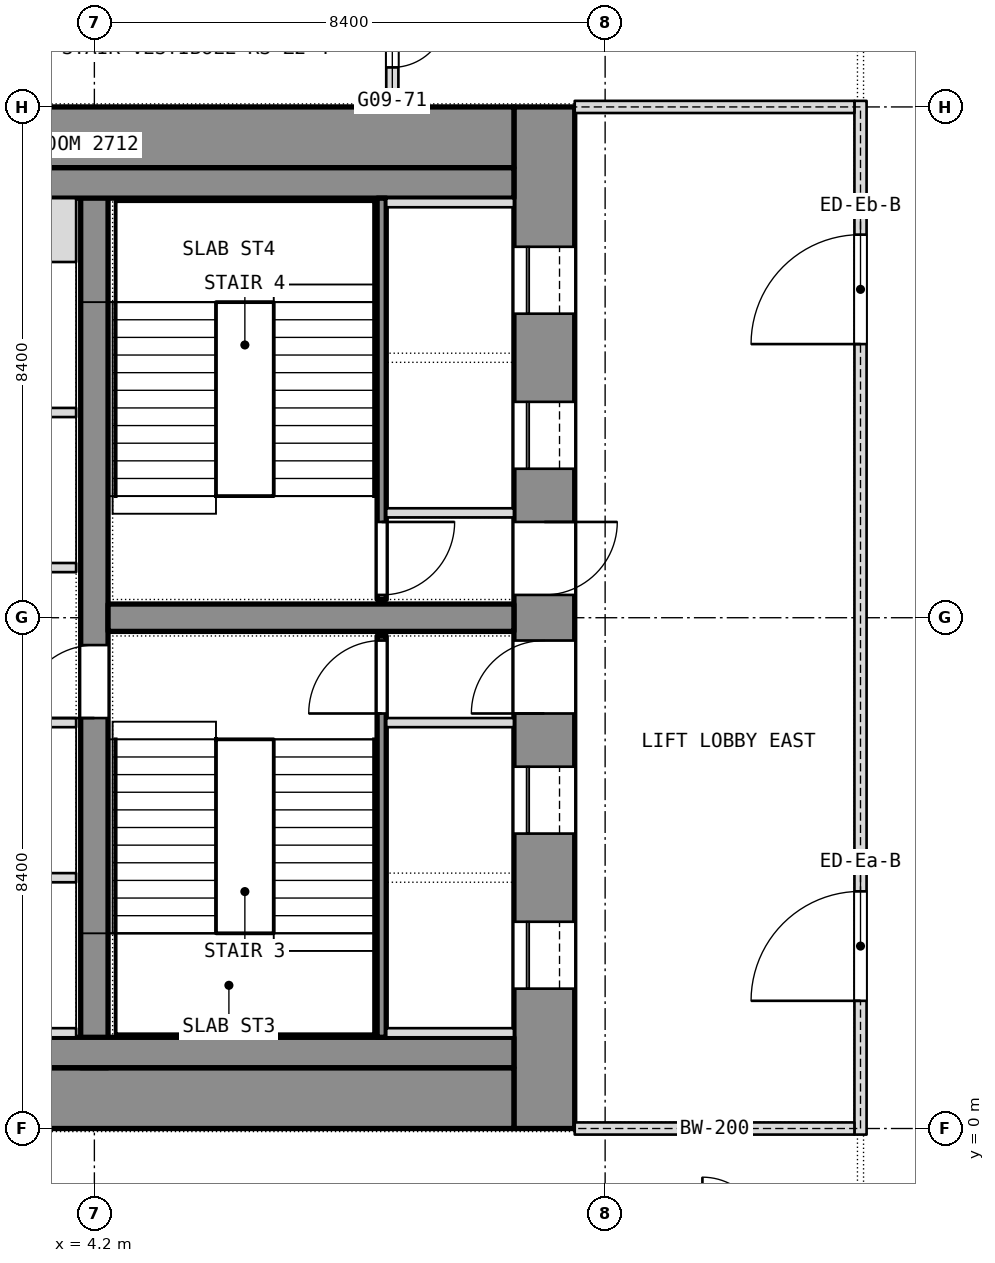
"""IFC4 building model, lengths in metres.
Left out: names, types, materials, properties, quantities, classifications, styles, units other than length and angle.
Written with IfcOpenShell. Run it as: python <this file> out.ifc"""

import sys

from ifc_helpers import new_model, si_unit, direction, frame, frame_2d, origin, place, context, subcontext, project, spatial, rectangle, extrude, element, fill, save


model = new_model("IFC4")
c1 = context("Model", 3, precision=1e-05, world=origin(), true_north=direction((0.0, 1.0)))
c2 = subcontext(c1, "Body", "Model", "MODEL_VIEW")
j1 = project(units=[si_unit("LENGTHUNIT", "METRE"), si_unit("PLANEANGLEUNIT", "RADIAN")], contexts=[c1])
p1 = place(None, origin())
s1 = spatial("IfcSite", under=j1, at=p1, CompositionType="ELEMENT")
p2 = place(p1, origin())
s2 = spatial("IfcBuilding", under=s1, at=p2, CompositionType="ELEMENT")
p3 = place(p2, frame((0.0, 0.0, 122.9)))
s3 = spatial("IfcBuildingStorey", under=s2, at=p3, CompositionType="ELEMENT", Elevation=122.9)
p4 = place(p3, frame((11.6, 0.0, 0.0), z_axis=(0.0, 0.0, 1.0), x_axis=(0.0, 1.0, 0.0)))
e1 = element("IfcWall", 1, at=p4, inside=s3, PredefinedType="SHEAR", context=c2, shape_type="SweptSolid", body=[
    extrude(rectangle(XDim=16.8, YDim=1.0, at=frame_2d((8.4, 0.0))), origin(), (0.0, 0.0, 1.0), 3.6),
])
p5 = place(p4, frame((2.3, 0.0, 0.0)))
e2 = element("IfcOpeningElement", 2, at=p5, cuts=e1, PredefinedType="OPENING", context=c2, shape_type="SweptSolid", body=[
    extrude(rectangle(XDim=1.1, YDim=2.1, at=frame_2d((0.55, 1.05))), frame((0.0, 0.5, 0.0), z_axis=(0.0, -1.0, 0.0), x_axis=(1.0, 0.0, 0.0)), (0.0, 0.0, 1.0), 1.0),
])
p6 = place(p4, frame((4.85, 0.0, 0.0)))
e3 = element("IfcOpeningElement", 3, at=p6, cuts=e1, PredefinedType="OPENING", context=c2, shape_type="SweptSolid", body=[
    extrude(rectangle(XDim=1.1, YDim=2.1, at=frame_2d((0.55, 1.05))), frame((0.0, 0.5, 0.0), z_axis=(0.0, -1.0, 0.0), x_axis=(1.0, 0.0, 0.0)), (0.0, 0.0, 1.0), 1.0),
])
p7 = place(p4, frame((6.825, 0.0, 0.0)))
e4 = element("IfcOpeningElement", 4, at=p7, cuts=e1, PredefinedType="OPENING", context=c2, shape_type="SweptSolid", body=[
    extrude(rectangle(XDim=1.2, YDim=2.1, at=frame_2d((0.6, 1.05))), frame((0.0, 0.5, 0.0), z_axis=(0.0, -1.0, 0.0), x_axis=(1.0, 0.0, 0.0)), (0.0, 0.0, 1.0), 1.0),
])
p8 = place(p4, frame((13.4, 0.0, 0.0)))
e5 = element("IfcOpeningElement", 5, at=p8, cuts=e1, PredefinedType="OPENING", context=c2, shape_type="SweptSolid", body=[
    extrude(rectangle(XDim=1.1, YDim=2.1, at=frame_2d((0.55, 1.05))), frame((0.0, 0.5, 0.0), z_axis=(0.0, -1.0, 0.0), x_axis=(1.0, 0.0, 0.0)), (0.0, 0.0, 1.0), 1.0),
])
p9 = place(p4, frame((10.85, 0.0, 0.0)))
e6 = element("IfcOpeningElement", 6, at=p9, cuts=e1, PredefinedType="OPENING", context=c2, shape_type="SweptSolid", body=[
    extrude(rectangle(XDim=1.1, YDim=2.1, at=frame_2d((0.55, 1.05))), frame((0.0, 0.5, 0.0), z_axis=(0.0, -1.0, 0.0), x_axis=(1.0, 0.0, 0.0)), (0.0, 0.0, 1.0), 1.0),
])
p10 = place(p4, frame((8.775, 0.0, 0.0)))
e7 = element("IfcOpeningElement", 7, at=p10, cuts=e1, PredefinedType="OPENING", context=c2, shape_type="SweptSolid", body=[
    extrude(rectangle(XDim=1.2, YDim=2.1, at=frame_2d((0.6, 1.05))), frame((0.0, 0.5, 0.0), z_axis=(0.0, -1.0, 0.0), x_axis=(1.0, 0.0, 0.0)), (0.0, 0.0, 1.0), 1.0),
])
for number, where, z_axis, x_axis in (
    (8, (-11.1, 0.5, 0.0), (0.0, 0.0, 1.0), (1.0, 0.0, 0.0)),
    (9, (-11.1, 16.3, 0.0), (0.0, 0.0, 1.0), (1.0, 0.0, 0.0)),
):
    element("IfcWall", number, at=place(p3, frame(where, z_axis=z_axis, x_axis=x_axis)), inside=s3, PredefinedType="SHEAR", context=c2, shape_type="SweptSolid", body=[
        extrude(rectangle(XDim=22.2, YDim=1.0, at=frame_2d((11.1, 0.0))), origin(), (0.0, 0.0, 1.0), 3.6),
    ])
p11 = place(p3, frame((4.2, 1.0, 0.0), z_axis=(0.0, 0.0, 1.0), x_axis=(0.0, 1.0, 0.0)))
e10 = element("IfcWall", 10, at=p11, inside=s3, PredefinedType="SHEAR", context=c2, shape_type="SweptSolid", body=[
    extrude(rectangle(XDim=14.8, YDim=0.45, at=frame_2d((7.4, 0.0))), origin(), (0.0, 0.0, 1.0), 3.6),
])
p12 = place(p11, frame((5.75, 0.0, 0.0)))
e11 = element("IfcOpeningElement", 11, at=p12, cuts=e10, PredefinedType="OPENING", context=c2, shape_type="SweptSolid", body=[
    extrude(rectangle(XDim=1.2, YDim=2.1, at=frame_2d((0.6, 1.05))), frame((0.0, 0.225, 0.0), z_axis=(0.0, -1.0, 0.0), x_axis=(1.0, 0.0, 0.0)), (0.0, 0.0, 1.0), 0.45),
])
p13 = place(p3, frame((4.425, 8.4, 0.0), z_axis=(0.0, 0.0, 1.0), x_axis=(1.0, 0.0, 0.0)))
e12 = element("IfcWall", 12, at=p13, inside=s3, PredefinedType="SHEAR", context=c2, shape_type="SweptSolid", body=[
    extrude(rectangle(XDim=6.675, YDim=0.45, at=frame_2d((3.337, 0.0))), origin(), (0.0, 0.0, 1.0), 3.6),
])
p14 = place(p3, frame((9.1, 16.9, 0.0), z_axis=(0.0, 0.0, 1.0), x_axis=(0.0, 1.0, 0.0)))
e13 = element("IfcWall", 13, at=p14, inside=s3, PredefinedType="PARTITIONING", context=c2, shape_type="SweptSolid", body=[
    extrude(rectangle(XDim=1.8, YDim=0.2, at=frame_2d((0.9, 0.0))), origin(), (0.0, 0.0, 1.0), 3.34),
])
p15 = place(p14, frame((0.55, 0.0, 0.0)))
e14 = element("IfcOpeningElement", 14, at=p15, cuts=e13, PredefinedType="OPENING", context=c2, shape_type="SweptSolid", body=[
    extrude(rectangle(XDim=0.9, YDim=2.1, at=frame_2d((0.45, 1.05))), frame((0.0, 0.1, 0.0), z_axis=(0.0, -1.0, 0.0), x_axis=(1.0, 0.0, 0.0)), (0.0, 0.0, 1.0), 0.2),
])
for number, where, z_axis, x_axis in (
    (15, (-11.1, 1.25, 0.0), (0.0, 0.0, 1.0), (1.0, 0.0, 0.0)),
    (16, (-11.1, 15.55, 0.0), (0.0, 0.0, 1.0), (1.0, 0.0, 0.0)),
):
    element("IfcWall", number, at=place(p3, frame(where, z_axis=z_axis, x_axis=x_axis)), inside=s3, PredefinedType="PARTITIONING", context=c2, shape_type="SweptSolid", body=[
        extrude(rectangle(XDim=22.2, YDim=0.5, at=frame_2d((11.1, 0.0))), origin(), (0.0, 0.0, 1.0), 3.34),
    ])
p16 = place(p3, frame((8.925, 1.5, 0.0), z_axis=(0.0, 0.0, 1.0), x_axis=(0.0, 1.0, 0.0)))
e17 = element("IfcWall", 17, at=p16, inside=s3, PredefinedType="SHEAR", context=c2, shape_type="SweptSolid", body=[
    extrude(rectangle(XDim=6.6, YDim=0.15, at=frame_2d((3.3, 0.0))), origin(), (0.0, 0.0, 1.0), 3.34),
])
p17 = place(p16, frame((5.325, 0.0, 0.0)))
e18 = element("IfcOpeningElement", 18, at=p17, cuts=e17, PredefinedType="OPENING", context=c2, shape_type="SweptSolid", body=[
    extrude(rectangle(XDim=1.2, YDim=2.1, at=frame_2d((0.6, 1.05))), frame((0.0, 0.075, 0.0), z_axis=(0.0, -1.0, 0.0), x_axis=(1.0, 0.0, 0.0)), (0.0, 0.0, 1.0), 0.15),
])
for number, where, z_axis, x_axis in (
    (19, (9.0, 6.675, 0.0), (0.0, 0.0, 1.0), (1.0, 0.0, 0.0)),
    (20, (9.0, 1.575, 0.0), (0.0, 0.0, 1.0), (1.0, 0.0, 0.0)),
):
    element("IfcWall", number, at=place(p3, frame(where, z_axis=z_axis, x_axis=x_axis)), inside=s3, PredefinedType="SHEAR", context=c2, shape_type="SweptSolid", body=[
        extrude(rectangle(XDim=2.1, YDim=0.15, at=frame_2d((1.05, 0.0))), origin(), (0.0, 0.0, 1.0), 3.6),
    ])
p18 = place(p3, frame((8.925, 8.7, 0.0), z_axis=(0.0, 0.0, 1.0), x_axis=(0.0, 1.0, 0.0)))
e21 = element("IfcWall", 21, at=p18, inside=s3, PredefinedType="SHEAR", context=c2, shape_type="SweptSolid", body=[
    extrude(rectangle(XDim=6.6, YDim=0.15, at=frame_2d((3.3, 0.0))), origin(), (0.0, 0.0, 1.0), 3.34),
])
p19 = place(p18, frame((0.075, 0.0, 0.0)))
e22 = element("IfcOpeningElement", 22, at=p19, cuts=e21, PredefinedType="OPENING", context=c2, shape_type="SweptSolid", body=[
    extrude(rectangle(XDim=1.2, YDim=2.1, at=frame_2d((0.6, 1.05))), frame((0.0, 0.075, 0.0), z_axis=(0.0, -1.0, 0.0), x_axis=(1.0, 0.0, 0.0)), (0.0, 0.0, 1.0), 0.15),
])
for number, where, z_axis, x_axis in (
    (23, (9.0, 10.125, 0.0), (0.0, 0.0, 1.0), (1.0, 0.0, 0.0)),
    (24, (9.0, 15.225, 0.0), (0.0, 0.0, 1.0), (1.0, 0.0, 0.0)),
):
    element("IfcWall", number, at=place(p3, frame(where, z_axis=z_axis, x_axis=x_axis)), inside=s3, PredefinedType="SHEAR", context=c2, shape_type="SweptSolid", body=[
        extrude(rectangle(XDim=2.1, YDim=0.15, at=frame_2d((1.05, 0.0))), origin(), (0.0, 0.0, 1.0), 3.6),
    ])
p20 = place(p3, frame((-3.9, 4.125, 0.0), z_axis=(0.0, 0.0, 1.0), x_axis=(1.0, 0.0, 0.0)))
e25 = element("IfcWall", 25, at=p20, inside=s3, PredefinedType="PARTITIONING", context=c2, shape_type="SweptSolid", body=[
    extrude(rectangle(XDim=7.8, YDim=0.15, at=frame_2d((3.9, 0.0))), origin(), (0.0, 0.0, 1.0), 3.34),
])
p21 = place(p20, frame((3.75, 0.0, 0.0)))
e26 = element("IfcOpeningElement", 26, at=p21, cuts=e25, PredefinedType="OPENING", context=c2, shape_type="SweptSolid", body=[
    extrude(rectangle(XDim=1.2, YDim=2.1, at=frame_2d((0.6, 1.05))), frame((0.0, 0.075, 0.0), z_axis=(0.0, -1.0, 0.0), x_axis=(1.0, 0.0, 0.0)), (0.0, 0.0, 1.0), 0.15),
])
p22 = place(p3, frame((-3.9, 11.775, 0.0), z_axis=(0.0, 0.0, 1.0), x_axis=(1.0, 0.0, 0.0)))
e27 = element("IfcWall", 27, at=p22, inside=s3, PredefinedType="PARTITIONING", context=c2, shape_type="SweptSolid", body=[
    extrude(rectangle(XDim=7.8, YDim=0.15, at=frame_2d((3.9, 0.0))), origin(), (0.0, 0.0, 1.0), 3.34),
])
p23 = place(p22, frame((3.3, 0.0, 0.0)))
e28 = element("IfcOpeningElement", 28, at=p23, cuts=e27, PredefinedType="OPENING", context=c2, shape_type="SweptSolid", body=[
    extrude(rectangle(XDim=1.2, YDim=2.1, at=frame_2d((0.6, 1.05))), frame((0.0, 0.075, 0.0), z_axis=(0.0, -1.0, 0.0), x_axis=(1.0, 0.0, 0.0)), (0.0, 0.0, 1.0), 0.15),
])
p24 = place(p3, frame((1.65, 1.575, 0.0), z_axis=(0.0, 0.0, 1.0), x_axis=(1.0, 0.0, 0.0)))
e29 = element("IfcWall", 29, at=p24, inside=s3, PredefinedType="SHEAR", context=c2, shape_type="SweptSolid", body=[
    extrude(rectangle(XDim=2.25, YDim=0.15, at=frame_2d((1.125, 0.0))), origin(), (0.0, 0.0, 1.0), 3.6),
])
p25 = place(p3, frame((1.65, 14.775, 0.0), z_axis=(0.0, 0.0, 1.0), x_axis=(1.0, 0.0, 0.0)))
e30 = element("IfcWall", 30, at=p25, inside=s3, PredefinedType="SHEAR", context=c2, shape_type="SweptSolid", body=[
    extrude(rectangle(XDim=2.25, YDim=1.05, at=frame_2d((1.125, 0.0))), origin(), (0.0, 0.0, 1.0), 3.6),
])
for number, where, z_axis, x_axis in (
    (31, (1.65, 6.675, 0.0), (0.0, 0.0, 1.0), (1.0, 0.0, 0.0)),
    (32, (1.65, 9.225, 0.0), (0.0, 0.0, 1.0), (1.0, 0.0, 0.0)),
):
    element("IfcWall", number, at=place(p3, frame(where, z_axis=z_axis, x_axis=x_axis)), inside=s3, PredefinedType="SHEAR", context=c2, shape_type="SweptSolid", body=[
        extrude(rectangle(XDim=2.25, YDim=0.15, at=frame_2d((1.125, 0.0))), origin(), (0.0, 0.0, 1.0), 3.6),
    ])
p26 = place(p3, frame((16.8, -0.1, 0.0), z_axis=(0.0, 0.0, 1.0), x_axis=(0.0, 1.0, 0.0)))
e33 = element("IfcWall", 33, at=p26, inside=s3, PredefinedType="PARTITIONING", context=c2, shape_type="SweptSolid", body=[
    extrude(rectangle(XDim=17.0, YDim=0.2, at=frame_2d((8.5, 0.0))), origin(), (0.0, 0.0, 1.0), 3.34),
])
p27 = place(p26, frame((2.2, 0.0, 0.0)))
e34 = element("IfcOpeningElement", 34, at=p27, cuts=e33, PredefinedType="OPENING", context=c2, shape_type="SweptSolid", body=[
    extrude(rectangle(XDim=1.8, YDim=2.1, at=frame_2d((0.9, 1.05))), frame((0.0, 0.1, 0.0), z_axis=(0.0, -1.0, 0.0), x_axis=(1.0, 0.0, 0.0)), (0.0, 0.0, 1.0), 0.2),
])
p28 = place(p26, frame((13.0, 0.0, 0.0)))
e35 = element("IfcOpeningElement", 35, at=p28, cuts=e33, PredefinedType="OPENING", context=c2, shape_type="SweptSolid", body=[
    extrude(rectangle(XDim=1.8, YDim=2.1, at=frame_2d((0.9, 1.05))), frame((0.0, 0.1, 0.0), z_axis=(0.0, -1.0, 0.0), x_axis=(1.0, 0.0, 0.0)), (0.0, 0.0, 1.0), 0.2),
])
for number, where, z_axis, x_axis in (
    (36, (12.1, 0.0, 0.0), (0.0, 0.0, 1.0), (1.0, 0.0, 0.0)),
    (37, (12.1, 16.8, 0.0), (0.0, 0.0, 1.0), (1.0, 0.0, 0.0)),
):
    element("IfcWall", number, at=place(p3, frame(where, z_axis=z_axis, x_axis=x_axis)), inside=s3, PredefinedType="PARTITIONING", context=c2, shape_type="SweptSolid", body=[
        extrude(rectangle(XDim=4.6, YDim=0.2, at=frame_2d((2.3, 0.0))), origin(), (0.0, 0.0, 1.0), 2.89),
    ])
p29 = place(p15, origin())
e38 = element("IfcDoor", 38, at=p29, inside=s3, OperationType="SINGLE_SWING_RIGHT", PredefinedType="DOOR", context=c2, shape_type="SweptSolid", body=[
    extrude(rectangle(XDim=0.9, YDim=2.1, at=frame_2d((0.45, 1.05))), frame((0.0, 0.025, 0.0), z_axis=(0.0, -1.0, 0.0), x_axis=(1.0, 0.0, 0.0)), (0.0, 0.0, 1.0), 0.05),
])
fill(e14, e38)
p30 = place(p5, origin())
e39 = element("IfcDoor", 39, at=p30, inside=s3, OperationType="SLIDING_TO_LEFT", PredefinedType="DOOR", context=c2, shape_type="SweptSolid", body=[
    extrude(rectangle(XDim=1.1, YDim=2.1, at=frame_2d((0.55, 1.05))), frame((0.0, 0.025, 0.0), z_axis=(0.0, -1.0, 0.0), x_axis=(1.0, 0.0, 0.0)), (0.0, 0.0, 1.0), 0.05),
])
fill(e2, e39)
p31 = place(p6, origin())
e40 = element("IfcDoor", 40, at=p31, inside=s3, OperationType="SLIDING_TO_LEFT", PredefinedType="DOOR", context=c2, shape_type="SweptSolid", body=[
    extrude(rectangle(XDim=1.1, YDim=2.1, at=frame_2d((0.55, 1.05))), frame((0.0, 0.025, 0.0), z_axis=(0.0, -1.0, 0.0), x_axis=(1.0, 0.0, 0.0)), (0.0, 0.0, 1.0), 0.05),
])
fill(e3, e40)
p32 = place(p7, origin())
e41 = element("IfcDoor", 41, at=p32, inside=s3, OperationType="SINGLE_SWING_LEFT", PredefinedType="DOOR", context=c2, shape_type="SweptSolid", body=[
    extrude(rectangle(XDim=1.2, YDim=2.1, at=frame_2d((0.6, 1.05))), frame((0.0, 0.025, 0.0), z_axis=(0.0, -1.0, 0.0), x_axis=(1.0, 0.0, 0.0)), (0.0, 0.0, 1.0), 0.05),
])
fill(e4, e41)
p33 = place(p17, origin())
e42 = element("IfcDoor", 42, at=p33, inside=s3, OperationType="SINGLE_SWING_LEFT", PredefinedType="DOOR", context=c2, shape_type="SweptSolid", body=[
    extrude(rectangle(XDim=1.2, YDim=2.1, at=frame_2d((0.6, 1.05))), frame((0.0, 0.025, 0.0), z_axis=(0.0, -1.0, 0.0), x_axis=(1.0, 0.0, 0.0)), (0.0, 0.0, 1.0), 0.05),
])
fill(e18, e42)
p34 = place(p8, origin())
e43 = element("IfcDoor", 43, at=p34, inside=s3, OperationType="SLIDING_TO_LEFT", PredefinedType="DOOR", context=c2, shape_type="SweptSolid", body=[
    extrude(rectangle(XDim=1.1, YDim=2.1, at=frame_2d((0.55, 1.05))), frame((0.0, 0.025, 0.0), z_axis=(0.0, -1.0, 0.0), x_axis=(1.0, 0.0, 0.0)), (0.0, 0.0, 1.0), 0.05),
])
fill(e5, e43)
p35 = place(p9, origin())
e44 = element("IfcDoor", 44, at=p35, inside=s3, OperationType="SLIDING_TO_LEFT", PredefinedType="DOOR", context=c2, shape_type="SweptSolid", body=[
    extrude(rectangle(XDim=1.1, YDim=2.1, at=frame_2d((0.55, 1.05))), frame((0.0, 0.025, 0.0), z_axis=(0.0, -1.0, 0.0), x_axis=(1.0, 0.0, 0.0)), (0.0, 0.0, 1.0), 0.05),
])
fill(e6, e44)
p36 = place(p10, origin())
e45 = element("IfcDoor", 45, at=p36, inside=s3, OperationType="SINGLE_SWING_LEFT", PredefinedType="DOOR", context=c2, shape_type="SweptSolid", body=[
    extrude(rectangle(XDim=1.2, YDim=2.1, at=frame_2d((0.6, 1.05))), frame((0.0, 0.025, 0.0), z_axis=(0.0, -1.0, 0.0), x_axis=(1.0, 0.0, 0.0)), (0.0, 0.0, 1.0), 0.05),
])
fill(e7, e45)
p37 = place(p19, origin())
e46 = element("IfcDoor", 46, at=p37, inside=s3, OperationType="SINGLE_SWING_LEFT", PredefinedType="DOOR", context=c2, shape_type="SweptSolid", body=[
    extrude(rectangle(XDim=1.2, YDim=2.1, at=frame_2d((0.6, 1.05))), frame((0.0, 0.025, 0.0), z_axis=(0.0, -1.0, 0.0), x_axis=(1.0, 0.0, 0.0)), (0.0, 0.0, 1.0), 0.05),
])
fill(e22, e46)
p38 = place(p12, origin())
e47 = element("IfcDoor", 47, at=p38, inside=s3, OperationType="SINGLE_SWING_LEFT", PredefinedType="DOOR", context=c2, shape_type="SweptSolid", body=[
    extrude(rectangle(XDim=1.2, YDim=2.1, at=frame_2d((0.6, 1.05))), frame((0.0, 0.025, 0.0), z_axis=(0.0, -1.0, 0.0), x_axis=(1.0, 0.0, 0.0)), (0.0, 0.0, 1.0), 0.05),
])
fill(e11, e47)
p39 = place(p27, origin())
e48 = element("IfcDoor", 48, at=p39, inside=s3, OperationType="DOUBLE_DOOR_SINGLE_SWING", PredefinedType="DOOR", context=c2, shape_type="SweptSolid", body=[
    extrude(rectangle(XDim=1.8, YDim=2.1, at=frame_2d((0.9, 1.05))), frame((0.0, 0.025, 0.0), z_axis=(0.0, -1.0, 0.0), x_axis=(1.0, 0.0, 0.0)), (0.0, 0.0, 1.0), 0.05),
])
fill(e34, e48)
p40 = place(p28, origin())
e49 = element("IfcDoor", 49, at=p40, inside=s3, OperationType="DOUBLE_DOOR_SINGLE_SWING", PredefinedType="DOOR", context=c2, shape_type="SweptSolid", body=[
    extrude(rectangle(XDim=1.8, YDim=2.1, at=frame_2d((0.9, 1.05))), frame((0.0, 0.025, 0.0), z_axis=(0.0, -1.0, 0.0), x_axis=(1.0, 0.0, 0.0)), (0.0, 0.0, 1.0), 0.05),
])
fill(e35, e49)
save(model, sys.argv[1])
